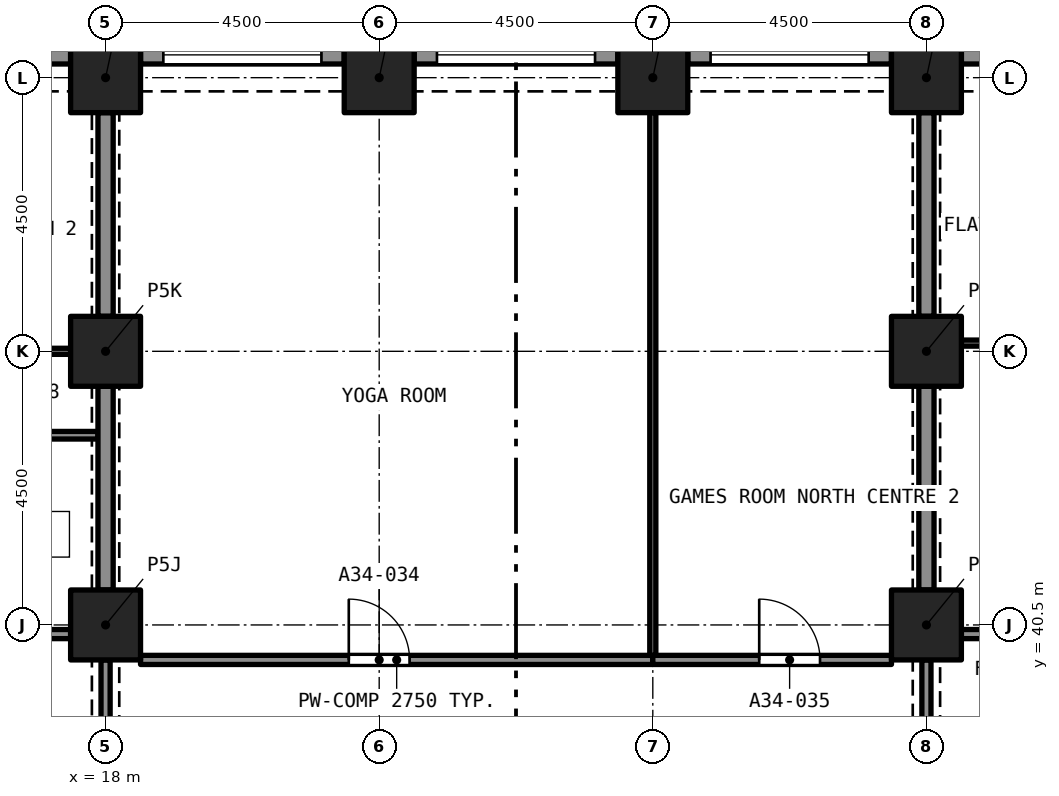
"""IFC4 building model, lengths in metres.
Left out: names, types, materials, properties, quantities, classifications, styles, units other than length and angle.
Written with IfcOpenShell. Run it as: python <this file> out.ifc"""

import sys

from ifc_helpers import new_model, si_unit, direction, frame, frame_2d, origin, origin_2d, place, context, subcontext, project, spatial, rectangle, extrude, element, fill, save


model = new_model("IFC4")
c1 = context("Model", 3, precision=1e-05, world=origin(), true_north=direction((0.0, 1.0)))
c2 = subcontext(c1, "Body", "Model", "MODEL_VIEW")
j1 = project(units=[si_unit("LENGTHUNIT", "METRE"), si_unit("PLANEANGLEUNIT", "RADIAN")], contexts=[c1])
p1 = place(None, origin())
s1 = spatial("IfcSite", under=j1, at=p1, CompositionType="ELEMENT")
p2 = place(p1, origin())
s2 = spatial("IfcBuilding", under=s1, at=p2, CompositionType="ELEMENT")
p3 = place(p2, frame((0.0, 0.0, 121.6)))
s3 = spatial("IfcBuildingStorey", under=s2, at=p3, CompositionType="ELEMENT", Elevation=121.6)
for number, where, z_axis, x_axis in (
    (1, (18.0, 40.5, 0.0), (0.0, 0.0, 1.0), (1.0, 0.0, 0.0)),
    (2, (31.5, 40.5, 0.0), (0.0, 0.0, 1.0), (1.0, 0.0, 0.0)),
    (3, (18.0, 45.0, 0.0), (0.0, 0.0, 1.0), (1.0, 0.0, 0.0)),
    (4, (31.5, 45.0, 0.0), (0.0, 0.0, 1.0), (1.0, 0.0, 0.0)),
    (5, (18.0, 49.5, 0.0), (0.0, 0.0, 1.0), (1.0, 0.0, 0.0)),
    (6, (22.5, 49.5, 0.0), (0.0, 0.0, 1.0), (1.0, 0.0, 0.0)),
    (7, (27.0, 49.5, 0.0), (0.0, 0.0, 1.0), (1.0, 0.0, 0.0)),
    (8, (31.5, 49.5, 0.0), (0.0, 0.0, 1.0), (1.0, 0.0, 0.0)),
):
    element("IfcColumn", number, at=place(p3, frame(where, z_axis=z_axis, x_axis=x_axis)), inside=s3, PredefinedType="COLUMN", context=c2, shape_type="SweptSolid", body=[
        extrude(rectangle(XDim=1.15, YDim=1.15, at=origin_2d()), origin(), (0.0, 0.0, 1.0), 3.2),
    ])
p4 = place(p3, frame((32.075, 49.875, 0.0), z_axis=(0.0, 0.0, 1.0), x_axis=(1.0, 0.0, 0.0)))
e9 = element("IfcWall", 9, at=p4, inside=s3, PredefinedType="SOLIDWALL", context=c2, shape_type="SweptSolid", body=[
    extrude(rectangle(XDim=3.35, YDim=0.3, at=frame_2d((1.675, 0.0))), origin(), (0.0, 0.0, 1.0), 3.2),
])
p5 = place(p4, frame((0.375, 0.0, 0.45)))
e10 = element("IfcOpeningElement", 10, at=p5, cuts=e9, PredefinedType="OPENING", context=c2, shape_type="SweptSolid", body=[
    extrude(rectangle(XDim=2.6, YDim=1.95, at=frame_2d((1.3, 0.975))), frame((0.0, 0.16, 0.0), z_axis=(0.0, -1.0, 0.0), x_axis=(1.0, 0.0, 0.0)), (0.0, 0.0, 1.0), 0.32),
])
p6 = place(p3, frame((27.575, 49.875, 0.0), z_axis=(0.0, 0.0, 1.0), x_axis=(1.0, 0.0, 0.0)))
e11 = element("IfcWall", 11, at=p6, inside=s3, PredefinedType="SOLIDWALL", context=c2, shape_type="SweptSolid", body=[
    extrude(rectangle(XDim=3.35, YDim=0.3, at=frame_2d((1.675, 0.0))), origin(), (0.0, 0.0, 1.0), 3.2),
])
p7 = place(p6, frame((0.375, 0.0, 0.45)))
e12 = element("IfcOpeningElement", 12, at=p7, cuts=e11, PredefinedType="OPENING", context=c2, shape_type="SweptSolid", body=[
    extrude(rectangle(XDim=2.6, YDim=1.95, at=frame_2d((1.3, 0.975))), frame((0.0, 0.16, 0.0), z_axis=(0.0, -1.0, 0.0), x_axis=(1.0, 0.0, 0.0)), (0.0, 0.0, 1.0), 0.32),
])
p8 = place(p3, frame((23.075, 49.875, 0.0), z_axis=(0.0, 0.0, 1.0), x_axis=(1.0, 0.0, 0.0)))
e13 = element("IfcWall", 13, at=p8, inside=s3, PredefinedType="SOLIDWALL", context=c2, shape_type="SweptSolid", body=[
    extrude(rectangle(XDim=3.35, YDim=0.3, at=frame_2d((1.675, 0.0))), origin(), (0.0, 0.0, 1.0), 3.2),
])
p9 = place(p8, frame((0.375, 0.0, 0.45)))
e14 = element("IfcOpeningElement", 14, at=p9, cuts=e13, PredefinedType="OPENING", context=c2, shape_type="SweptSolid", body=[
    extrude(rectangle(XDim=2.6, YDim=1.95, at=frame_2d((1.3, 0.975))), frame((0.0, 0.16, 0.0), z_axis=(0.0, -1.0, 0.0), x_axis=(1.0, 0.0, 0.0)), (0.0, 0.0, 1.0), 0.32),
])
p10 = place(p3, frame((18.575, 49.875, 0.0), z_axis=(0.0, 0.0, 1.0), x_axis=(1.0, 0.0, 0.0)))
e15 = element("IfcWall", 15, at=p10, inside=s3, PredefinedType="SOLIDWALL", context=c2, shape_type="SweptSolid", body=[
    extrude(rectangle(XDim=3.35, YDim=0.3, at=frame_2d((1.675, 0.0))), origin(), (0.0, 0.0, 1.0), 3.2),
])
p11 = place(p10, frame((0.375, 0.0, 0.45)))
e16 = element("IfcOpeningElement", 16, at=p11, cuts=e15, PredefinedType="OPENING", context=c2, shape_type="SweptSolid", body=[
    extrude(rectangle(XDim=2.6, YDim=1.95, at=frame_2d((1.3, 0.975))), frame((0.0, 0.16, 0.0), z_axis=(0.0, -1.0, 0.0), x_axis=(1.0, 0.0, 0.0)), (0.0, 0.0, 1.0), 0.32),
])
p12 = place(p3, frame((14.075, 49.875, 0.0), z_axis=(0.0, 0.0, 1.0), x_axis=(1.0, 0.0, 0.0)))
e17 = element("IfcWall", 17, at=p12, inside=s3, PredefinedType="SOLIDWALL", context=c2, shape_type="SweptSolid", body=[
    extrude(rectangle(XDim=3.35, YDim=0.3, at=frame_2d((1.675, 0.0))), origin(), (0.0, 0.0, 1.0), 3.2),
])
p13 = place(p12, frame((0.375, 0.0, 0.45)))
e18 = element("IfcOpeningElement", 18, at=p13, cuts=e17, PredefinedType="OPENING", context=c2, shape_type="SweptSolid", body=[
    extrude(rectangle(XDim=2.6, YDim=1.95, at=frame_2d((1.3, 0.975))), frame((0.0, 0.16, 0.0), z_axis=(0.0, -1.0, 0.0), x_axis=(1.0, 0.0, 0.0)), (0.0, 0.0, 1.0), 0.32),
])
p14 = place(p3, frame((17.875, 43.62, 0.0), z_axis=(0.0, 0.0, 1.0), x_axis=(-1.0, 0.0, 0.0)))
e19 = element("IfcWall", 19, at=p14, inside=s3, PredefinedType="PARTITIONING", context=c2, shape_type="SweptSolid", body=[
    extrude(rectangle(XDim=2.7, YDim=0.125, at=frame_2d((1.35, 0.0))), origin(), (0.0, 0.0, 1.0), 2.85),
])
p15 = place(p14, frame((0.888, 0.0, 0.0)))
e20 = element("IfcOpeningElement", 20, at=p15, cuts=e19, PredefinedType="OPENING", context=c2, shape_type="SweptSolid", body=[
    extrude(rectangle(XDim=0.8, YDim=2.1, at=frame_2d((0.4, 1.05))), frame((0.0, 0.073, 0.0), z_axis=(0.0, -1.0, 0.0), x_axis=(1.0, 0.0, 0.0)), (0.0, 0.0, 1.0), 0.145),
])
p16 = place(p3, frame((18.0, 41.075, 0.0), z_axis=(0.0, 0.0, 1.0), x_axis=(0.0, 1.0, 0.0)))
e21 = element("IfcWall", 21, at=p16, inside=s3, PredefinedType="PARTITIONING", context=c2, shape_type="SweptSolid", body=[
    extrude(rectangle(XDim=3.35, YDim=0.25, at=frame_2d((1.675, 0.0))), origin(), (0.0, 0.0, 1.0), 2.38),
])
p17 = place(p3, frame((13.5, 45.0, 0.0), z_axis=(0.0, 0.0, 1.0), x_axis=(1.0, 0.0, 0.0)))
e22 = element("IfcWall", 22, at=p17, inside=s3, PredefinedType="PARTITIONING", context=c2, shape_type="SweptSolid", body=[
    extrude(rectangle(XDim=3.925, YDim=0.1, at=frame_2d((1.962, 0.0))), origin(), (0.0, 0.0, 1.0), 2.85),
])
p18 = place(p17, frame((1.8, 0.0, 0.0)))
e23 = element("IfcOpeningElement", 23, at=p18, cuts=e22, PredefinedType="OPENING", context=c2, shape_type="SweptSolid", body=[
    extrude(rectangle(XDim=0.9, YDim=2.1, at=frame_2d((0.45, 1.05))), frame((0.0, 0.06, 0.0), z_axis=(0.0, -1.0, 0.0), x_axis=(1.0, 0.0, 0.0)), (0.0, 0.0, 1.0), 0.12),
])
p19 = place(p3, frame((18.0, 45.575, 0.0), z_axis=(0.0, 0.0, 1.0), x_axis=(0.0, 1.0, 0.0)))
e24 = element("IfcWall", 24, at=p19, inside=s3, PredefinedType="PARTITIONING", context=c2, shape_type="SweptSolid", body=[
    extrude(rectangle(XDim=3.35, YDim=0.25, at=frame_2d((1.675, 0.0))), origin(), (0.0, 0.0, 1.0), 2.38),
])
p20 = place(p3, frame((13.35, 40.35, 0.0), z_axis=(0.0, 0.0, 1.0), x_axis=(1.0, 0.0, 0.0)))
e25 = element("IfcWall", 25, at=p20, inside=s3, PredefinedType="PARTITIONING", context=c2, shape_type="SweptSolid", body=[
    extrude(rectangle(XDim=4.075, YDim=0.15, at=frame_2d((2.038, 0.0))), origin(), (0.0, 0.0, 1.0), 2.85),
])
p21 = place(p3, frame((32.075, 45.135, 0.0), z_axis=(0.0, 0.0, 1.0), x_axis=(1.0, 0.0, 0.0)))
e26 = element("IfcWall", 26, at=p21, inside=s3, PredefinedType="PARTITIONING", context=c2, shape_type="SweptSolid", body=[
    extrude(rectangle(XDim=3.925, YDim=0.1, at=frame_2d((1.962, 0.0))), origin(), (0.0, 0.0, 1.0), 2.85),
])
p22 = place(p21, frame((1.175, 0.0, 0.0)))
e27 = element("IfcOpeningElement", 27, at=p22, cuts=e26, PredefinedType="OPENING", context=c2, shape_type="SweptSolid", body=[
    extrude(rectangle(XDim=1.0, YDim=2.1, at=frame_2d((0.5, 1.05))), frame((0.0, 0.06, 0.0), z_axis=(0.0, -1.0, 0.0), x_axis=(1.0, 0.0, 0.0)), (0.0, 0.0, 1.0), 0.12),
])
p23 = place(p3, frame((31.5, 41.075, 0.0), z_axis=(0.0, 0.0, 1.0), x_axis=(0.0, 1.0, 0.0)))
e28 = element("IfcWall", 28, at=p23, inside=s3, PredefinedType="PARTITIONING", context=c2, shape_type="SweptSolid", body=[
    extrude(rectangle(XDim=3.35, YDim=0.25, at=frame_2d((1.675, 0.0))), origin(), (0.0, 0.0, 1.0), 2.38),
])
p24 = place(p3, frame((32.075, 40.35, 0.0), z_axis=(0.0, 0.0, 1.0), x_axis=(1.0, 0.0, 0.0)))
e29 = element("IfcWall", 29, at=p24, inside=s3, PredefinedType="PARTITIONING", context=c2, shape_type="SweptSolid", body=[
    extrude(rectangle(XDim=2.35, YDim=0.15, at=frame_2d((1.175, 0.0))), origin(), (0.0, 0.0, 1.0), 2.85),
])
p25 = place(p24, frame((1.175, 0.0, 0.0)))
e30 = element("IfcOpeningElement", 30, at=p25, cuts=e29, PredefinedType="OPENING", context=c2, shape_type="SweptSolid", body=[
    extrude(rectangle(XDim=1.0, YDim=2.1, at=frame_2d((0.5, 1.05))), frame((0.0, 0.085, 0.0), z_axis=(0.0, -1.0, 0.0), x_axis=(1.0, 0.0, 0.0)), (0.0, 0.0, 1.0), 0.17),
])
p26 = place(p3, frame((31.5, 45.575, 0.0), z_axis=(0.0, 0.0, 1.0), x_axis=(0.0, 1.0, 0.0)))
e31 = element("IfcWall", 31, at=p26, inside=s3, PredefinedType="PARTITIONING", context=c2, shape_type="SweptSolid", body=[
    extrude(rectangle(XDim=3.35, YDim=0.25, at=frame_2d((1.675, 0.0))), origin(), (0.0, 0.0, 1.0), 2.38),
])
p27 = place(p3, frame((18.575, 39.925, 0.0), z_axis=(0.0, 0.0, 1.0), x_axis=(1.0, 0.0, 0.0)))
e32 = element("IfcWall", 32, at=p27, inside=s3, PredefinedType="PARTITIONING", context=c2, shape_type="SweptSolid", body=[
    extrude(rectangle(XDim=8.425, YDim=0.15, at=frame_2d((4.212, 0.0))), origin(), (0.0, 0.0, 1.0), 2.75),
])
p28 = place(p27, frame((3.425, 0.0, 0.0)))
e33 = element("IfcOpeningElement", 33, at=p28, cuts=e32, PredefinedType="OPENING", context=c2, shape_type="SweptSolid", body=[
    extrude(rectangle(XDim=1.0, YDim=2.1, at=frame_2d((0.5, 1.05))), frame((0.0, 0.085, 0.0), z_axis=(0.0, -1.0, 0.0), x_axis=(1.0, 0.0, 0.0)), (0.0, 0.0, 1.0), 0.17),
])
p29 = place(p3, frame((27.0, 39.925, 0.0), z_axis=(0.0, 0.0, 1.0), x_axis=(1.0, 0.0, 0.0)))
e34 = element("IfcWall", 34, at=p29, inside=s3, PredefinedType="PARTITIONING", context=c2, shape_type="SweptSolid", body=[
    extrude(rectangle(XDim=3.925, YDim=0.15, at=frame_2d((1.962, 0.0))), origin(), (0.0, 0.0, 1.0), 2.75),
])
p30 = place(p29, frame((1.75, 0.0, 0.0)))
e35 = element("IfcOpeningElement", 35, at=p30, cuts=e34, PredefinedType="OPENING", context=c2, shape_type="SweptSolid", body=[
    extrude(rectangle(XDim=1.0, YDim=2.1, at=frame_2d((0.5, 1.05))), frame((0.0, 0.085, 0.0), z_axis=(0.0, -1.0, 0.0), x_axis=(1.0, 0.0, 0.0)), (0.0, 0.0, 1.0), 0.17),
])
p31 = place(p3, frame((31.5, 36.575, 0.0), z_axis=(0.0, 0.0, 1.0), x_axis=(0.0, 1.0, 0.0)))
e36 = element("IfcWall", 36, at=p31, inside=s3, PredefinedType="PARTITIONING", context=c2, shape_type="SweptSolid", body=[
    extrude(rectangle(XDim=3.35, YDim=0.15, at=frame_2d((1.675, 0.0))), origin(), (0.0, 0.0, 1.0), 2.38),
])
p32 = place(p31, frame((1.075, 0.0, 0.0)))
e37 = element("IfcOpeningElement", 37, at=p32, cuts=e36, PredefinedType="OPENING", context=c2, shape_type="SweptSolid", body=[
    extrude(rectangle(XDim=1.2, YDim=2.1, at=frame_2d((0.6, 1.05))), frame((0.0, 0.085, 0.0), z_axis=(0.0, -1.0, 0.0), x_axis=(1.0, 0.0, 0.0)), (0.0, 0.0, 1.0), 0.17),
])
p33 = place(p3, frame((18.0, 39.925, 0.0), z_axis=(0.0, 0.0, 1.0), x_axis=(0.0, -1.0, 0.0)))
e38 = element("IfcWall", 38, at=p33, inside=s3, PredefinedType="PARTITIONING", context=c2, shape_type="SweptSolid", body=[
    extrude(rectangle(XDim=3.35, YDim=0.15, at=frame_2d((1.675, 0.0))), origin(), (0.0, 0.0, 1.0), 2.38),
])
p34 = place(p33, frame((1.075, 0.0, 0.0)))
e39 = element("IfcOpeningElement", 39, at=p34, cuts=e38, PredefinedType="OPENING", context=c2, shape_type="SweptSolid", body=[
    extrude(rectangle(XDim=1.2, YDim=2.1, at=frame_2d((0.6, 1.05))), frame((0.0, 0.085, 0.0), z_axis=(0.0, -1.0, 0.0), x_axis=(1.0, 0.0, 0.0)), (0.0, 0.0, 1.0), 0.17),
])
p35 = place(p3, frame((27.0, 40.0, 0.0), z_axis=(0.0, 0.0, 1.0), x_axis=(0.0, 1.0, 0.0)))
e40 = element("IfcWall", 40, at=p35, inside=s3, PredefinedType="PARTITIONING", context=c2, shape_type="SweptSolid", body=[
    extrude(rectangle(XDim=8.925, YDim=0.1, at=frame_2d((4.462, 0.0))), origin(), (0.0, 0.0, 1.0), 2.75),
])
p36 = place(p7, origin())
e41 = element("IfcWindow", 41, at=p36, inside=s3, PartitioningType="SINGLE_PANEL", PredefinedType="WINDOW", context=c2, shape_type="SweptSolid", body=[
    extrude(rectangle(XDim=2.6, YDim=1.95, at=frame_2d((1.3, 0.975))), frame((0.0, 0.03, 0.0), z_axis=(0.0, -1.0, 0.0), x_axis=(1.0, 0.0, 0.0)), (0.0, 0.0, 1.0), 0.06),
])
fill(e12, e41)
p37 = place(p9, origin())
e42 = element("IfcWindow", 42, at=p37, inside=s3, PartitioningType="SINGLE_PANEL", PredefinedType="WINDOW", context=c2, shape_type="SweptSolid", body=[
    extrude(rectangle(XDim=2.6, YDim=1.95, at=frame_2d((1.3, 0.975))), frame((0.0, 0.03, 0.0), z_axis=(0.0, -1.0, 0.0), x_axis=(1.0, 0.0, 0.0)), (0.0, 0.0, 1.0), 0.06),
])
fill(e14, e42)
p38 = place(p11, origin())
e43 = element("IfcWindow", 43, at=p38, inside=s3, PartitioningType="SINGLE_PANEL", PredefinedType="WINDOW", context=c2, shape_type="SweptSolid", body=[
    extrude(rectangle(XDim=2.6, YDim=1.95, at=frame_2d((1.3, 0.975))), frame((0.0, 0.03, 0.0), z_axis=(0.0, -1.0, 0.0), x_axis=(1.0, 0.0, 0.0)), (0.0, 0.0, 1.0), 0.06),
])
fill(e16, e43)
p39 = place(p28, origin())
e44 = element("IfcDoor", 44, at=p39, inside=s3, OperationType="SINGLE_SWING_LEFT", PredefinedType="DOOR", context=c2, shape_type="SweptSolid", body=[
    extrude(rectangle(XDim=1.0, YDim=2.1, at=frame_2d((0.5, 1.05))), frame((0.0, 0.025, 0.0), z_axis=(0.0, -1.0, 0.0), x_axis=(1.0, 0.0, 0.0)), (0.0, 0.0, 1.0), 0.05),
])
fill(e33, e44)
p40 = place(p30, origin())
e45 = element("IfcDoor", 45, at=p40, inside=s3, OperationType="SINGLE_SWING_RIGHT", PredefinedType="DOOR", context=c2, shape_type="SweptSolid", body=[
    extrude(rectangle(XDim=1.0, YDim=2.1, at=frame_2d((0.5, 1.05))), frame((0.0, 0.025, 0.0), z_axis=(0.0, -1.0, 0.0), x_axis=(1.0, 0.0, 0.0)), (0.0, 0.0, 1.0), 0.05),
])
fill(e35, e45)
save(model, sys.argv[1])
